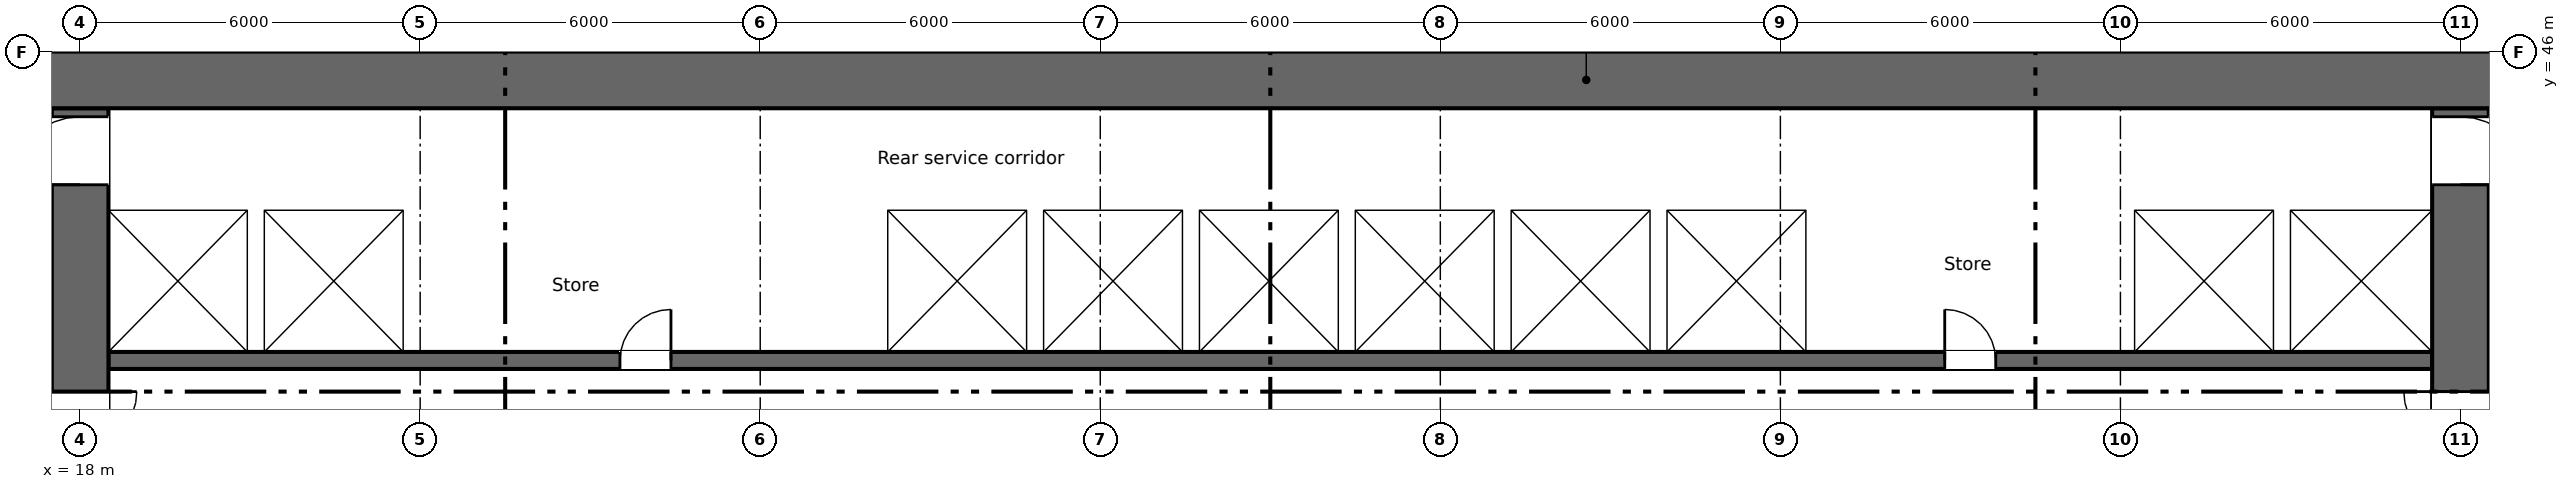
"""IFC4 building model, lengths in metres.
Left out: names, types, materials, properties, quantities, classifications, styles, units other than length and angle.
Written with IfcOpenShell. Run it as: python <this file> out.ifc"""

import sys

from ifc_helpers import new_model, si_unit, direction, frame, frame_2d, origin, place, context, subcontext, project, spatial, rectangle, extrude, element, fill, save


model = new_model("IFC4")
c1 = context("Model", 3, precision=1e-05, world=origin(), true_north=direction((0.0, 1.0)))
c2 = subcontext(c1, "Body", "Model", "MODEL_VIEW")
j1 = project(units=[si_unit("LENGTHUNIT", "METRE"), si_unit("PLANEANGLEUNIT", "RADIAN")], contexts=[c1])
p1 = place(None, origin())
s1 = spatial("IfcSite", under=j1, at=p1, CompositionType="ELEMENT")
p2 = place(p1, origin())
s2 = spatial("IfcBuilding", under=s1, at=p2, CompositionType="ELEMENT")
p3 = place(p2, frame((0.0, 0.0, 56.25)))
s3 = spatial("IfcBuildingStorey", under=s2, at=p3, CompositionType="ELEMENT", Elevation=56.25)
p4 = place(p3, frame((5.55, 45.5, 0.0), z_axis=(0.0, 0.0, 1.0), x_axis=(1.0, 0.0, 0.0)))
e1 = element("IfcWall", 1, at=p4, inside=s3, PredefinedType="SHEAR", context=c2, shape_type="SweptSolid", body=[
    extrude(rectangle(XDim=66.9, YDim=1.0, at=frame_2d((33.45, 0.0))), origin(), (0.0, 0.0, 1.0), 3.35),
])
p5 = place(p4, frame((1.2, 0.0, 0.6)))
e2 = element("IfcOpeningElement", 2, at=p5, cuts=e1, PredefinedType="OPENING", context=c2, shape_type="SweptSolid", body=[
    extrude(rectangle(XDim=0.6, YDim=2.4, at=frame_2d((0.3, 1.2))), frame((0.0, 0.51, 0.0), z_axis=(0.0, -1.0, 0.0), x_axis=(1.0, 0.0, 0.0)), (0.0, 0.0, 1.0), 1.02),
])
p6 = place(p4, frame((7.2, 0.0, 0.6)))
e3 = element("IfcOpeningElement", 3, at=p6, cuts=e1, PredefinedType="OPENING", context=c2, shape_type="SweptSolid", body=[
    extrude(rectangle(XDim=0.6, YDim=2.4, at=frame_2d((0.3, 1.2))), frame((0.0, 0.51, 0.0), z_axis=(0.0, -1.0, 0.0), x_axis=(1.0, 0.0, 0.0)), (0.0, 0.0, 1.0), 1.02),
])
p7 = place(p4, frame((61.2, 0.0, 0.6)))
e4 = element("IfcOpeningElement", 4, at=p7, cuts=e1, PredefinedType="OPENING", context=c2, shape_type="SweptSolid", body=[
    extrude(rectangle(XDim=0.6, YDim=2.4, at=frame_2d((0.3, 1.2))), frame((0.0, 0.51, 0.0), z_axis=(0.0, -1.0, 0.0), x_axis=(1.0, 0.0, 0.0)), (0.0, 0.0, 1.0), 1.02),
])
p8 = place(p3, frame((18.0, 28.4, 0.0), z_axis=(0.0, 0.0, 1.0), x_axis=(0.0, 1.0, 0.0)))
e5 = element("IfcWall", 5, at=p8, inside=s3, PredefinedType="SHEAR", context=c2, shape_type="SweptSolid", body=[
    extrude(rectangle(XDim=16.6, YDim=1.0, at=frame_2d((8.3, 0.0))), origin(), (0.0, 0.0, 1.0), 3.35),
])
p9 = place(p8, frame((9.6, 0.0, 0.0)))
e6 = element("IfcOpeningElement", 6, at=p9, cuts=e5, PredefinedType="OPENING", context=c2, shape_type="SweptSolid", body=[
    extrude(rectangle(XDim=2.0, YDim=2.1, at=frame_2d((1.0, 1.05))), frame((0.0, 0.51, 0.0), z_axis=(0.0, -1.0, 0.0), x_axis=(1.0, 0.0, 0.0)), (0.0, 0.0, 1.0), 1.02),
])
p10 = place(p8, frame((15.25, 0.0, 0.0)))
e7 = element("IfcOpeningElement", 7, at=p10, cuts=e5, PredefinedType="OPENING", context=c2, shape_type="SweptSolid", body=[
    extrude(rectangle(XDim=1.2, YDim=2.1, at=frame_2d((0.6, 1.05))), frame((0.0, 0.51, 0.0), z_axis=(0.0, -1.0, 0.0), x_axis=(1.0, 0.0, 0.0)), (0.0, 0.0, 1.0), 1.02),
])
p11 = place(p3, frame((60.0, 28.4, 0.0), z_axis=(0.0, 0.0, 1.0), x_axis=(0.0, 1.0, 0.0)))
e8 = element("IfcWall", 8, at=p11, inside=s3, PredefinedType="SHEAR", context=c2, shape_type="SweptSolid", body=[
    extrude(rectangle(XDim=16.6, YDim=1.0, at=frame_2d((8.3, 0.0))), origin(), (0.0, 0.0, 1.0), 3.35),
])
p12 = place(p11, frame((9.6, 0.0, 0.0)))
e9 = element("IfcOpeningElement", 9, at=p12, cuts=e8, PredefinedType="OPENING", context=c2, shape_type="SweptSolid", body=[
    extrude(rectangle(XDim=2.0, YDim=2.1, at=frame_2d((1.0, 1.05))), frame((0.0, 0.51, 0.0), z_axis=(0.0, -1.0, 0.0), x_axis=(1.0, 0.0, 0.0)), (0.0, 0.0, 1.0), 1.02),
])
p13 = place(p11, frame((15.25, 0.0, 0.0)))
e10 = element("IfcOpeningElement", 10, at=p13, cuts=e8, PredefinedType="OPENING", context=c2, shape_type="SweptSolid", body=[
    extrude(rectangle(XDim=1.2, YDim=2.1, at=frame_2d((0.6, 1.05))), frame((0.0, 0.51, 0.0), z_axis=(0.0, -1.0, 0.0), x_axis=(1.0, 0.0, 0.0)), (0.0, 0.0, 1.0), 1.02),
])
p14 = place(p3, frame((18.5, 40.55, 0.0), z_axis=(0.0, 0.0, 1.0), x_axis=(1.0, 0.0, 0.0)))
e11 = element("IfcWall", 11, at=p14, inside=s3, PredefinedType="SHEAR", context=c2, shape_type="SweptSolid", body=[
    extrude(rectangle(XDim=41.0, YDim=0.3, at=frame_2d((20.5, 0.0))), origin(), (0.0, 0.0, 1.0), 3.35),
])
p15 = place(p14, frame((9.025, 0.0, 0.0)))
e12 = element("IfcOpeningElement", 12, at=p15, cuts=e11, PredefinedType="OPENING", context=c2, shape_type="SweptSolid", body=[
    extrude(rectangle(XDim=0.9, YDim=2.1, at=frame_2d((0.45, 1.05))), frame((0.0, 0.16, 0.0), z_axis=(0.0, -1.0, 0.0), x_axis=(1.0, 0.0, 0.0)), (0.0, 0.0, 1.0), 0.32),
])
p16 = place(p14, frame((32.4, 0.0, 0.0)))
e13 = element("IfcOpeningElement", 13, at=p16, cuts=e11, PredefinedType="OPENING", context=c2, shape_type="SweptSolid", body=[
    extrude(rectangle(XDim=0.9, YDim=2.1, at=frame_2d((0.45, 1.05))), frame((0.0, 0.16, 0.0), z_axis=(0.0, -1.0, 0.0), x_axis=(1.0, 0.0, 0.0)), (0.0, 0.0, 1.0), 0.32),
])
p17 = place(p14, frame((14.425, 0.0, 0.0)))
e14 = element("IfcOpeningElement", 14, at=p17, cuts=e11, PredefinedType="OPENING", context=c2, shape_type="SweptSolid", body=[
    extrude(rectangle(XDim=1.1, YDim=2.1, at=frame_2d((0.55, 1.05))), frame((0.0, 0.16, 0.0), z_axis=(0.0, -1.0, 0.0), x_axis=(1.0, 0.0, 0.0)), (0.0, 0.0, 1.0), 0.32),
])
p18 = place(p14, frame((17.175, 0.0, 0.0)))
e15 = element("IfcOpeningElement", 15, at=p18, cuts=e11, PredefinedType="OPENING", context=c2, shape_type="SweptSolid", body=[
    extrude(rectangle(XDim=1.1, YDim=2.1, at=frame_2d((0.55, 1.05))), frame((0.0, 0.16, 0.0), z_axis=(0.0, -1.0, 0.0), x_axis=(1.0, 0.0, 0.0)), (0.0, 0.0, 1.0), 0.32),
])
p19 = place(p14, frame((19.925, 0.0, 0.0)))
e16 = element("IfcOpeningElement", 16, at=p19, cuts=e11, PredefinedType="OPENING", context=c2, shape_type="SweptSolid", body=[
    extrude(rectangle(XDim=1.1, YDim=2.1, at=frame_2d((0.55, 1.05))), frame((0.0, 0.16, 0.0), z_axis=(0.0, -1.0, 0.0), x_axis=(1.0, 0.0, 0.0)), (0.0, 0.0, 1.0), 0.32),
])
p20 = place(p14, frame((22.675, 0.0, 0.0)))
e17 = element("IfcOpeningElement", 17, at=p20, cuts=e11, PredefinedType="OPENING", context=c2, shape_type="SweptSolid", body=[
    extrude(rectangle(XDim=1.1, YDim=2.1, at=frame_2d((0.55, 1.05))), frame((0.0, 0.16, 0.0), z_axis=(0.0, -1.0, 0.0), x_axis=(1.0, 0.0, 0.0)), (0.0, 0.0, 1.0), 0.32),
])
p21 = place(p14, frame((36.375, 0.0, 0.0)))
e18 = element("IfcOpeningElement", 18, at=p21, cuts=e11, PredefinedType="OPENING", context=c2, shape_type="SweptSolid", body=[
    extrude(rectangle(XDim=1.2, YDim=2.1, at=frame_2d((0.6, 1.05))), frame((0.0, 0.16, 0.0), z_axis=(0.0, -1.0, 0.0), x_axis=(1.0, 0.0, 0.0)), (0.0, 0.0, 1.0), 0.32),
])
p22 = place(p14, frame((39.15, 0.0, 0.0)))
e19 = element("IfcOpeningElement", 19, at=p22, cuts=e11, PredefinedType="OPENING", context=c2, shape_type="SweptSolid", body=[
    extrude(rectangle(XDim=1.2, YDim=2.1, at=frame_2d((0.6, 1.05))), frame((0.0, 0.16, 0.0), z_axis=(0.0, -1.0, 0.0), x_axis=(1.0, 0.0, 0.0)), (0.0, 0.0, 1.0), 0.32),
])
p23 = place(p3, frame((18.5, 43.35, 0.0), z_axis=(0.0, 0.0, 1.0), x_axis=(1.0, 0.0, 0.0)))
e20 = element("IfcWall", 20, at=p23, inside=s3, PredefinedType="SHEAR", context=c2, shape_type="SweptSolid", body=[
    extrude(rectangle(XDim=41.0, YDim=0.3, at=frame_2d((20.5, 0.0))), origin(), (0.0, 0.0, 1.0), 3.35),
])
for number, where, z_axis, x_axis in (
    (21, (21.1, 40.7, 0.0), (0.0, 0.0, 1.0), (0.0, 1.0, 0.0)),
    (22, (23.85, 40.7, 0.0), (0.0, 0.0, 1.0), (0.0, 1.0, 0.0)),
    (23, (32.1, 40.7, 0.0), (0.0, 0.0, 1.0), (0.0, 1.0, 0.0)),
    (24, (34.85, 40.7, 0.0), (0.0, 0.0, 1.0), (0.0, 1.0, 0.0)),
    (25, (37.6, 40.7, 0.0), (0.0, 0.0, 1.0), (0.0, 1.0, 0.0)),
    (26, (40.35, 40.7, 0.0), (0.0, 0.0, 1.0), (0.0, 1.0, 0.0)),
    (27, (43.1, 40.7, 0.0), (0.0, 0.0, 1.0), (0.0, 1.0, 0.0)),
    (28, (45.85, 40.7, 0.0), (0.0, 0.0, 1.0), (0.0, 1.0, 0.0)),
    (29, (48.6, 40.7, 0.0), (0.0, 0.0, 1.0), (0.0, 1.0, 0.0)),
    (30, (54.1, 40.7, 0.0), (0.0, 0.0, 1.0), (0.0, 1.0, 0.0)),
    (31, (56.85, 40.7, 0.0), (0.0, 0.0, 1.0), (0.0, 1.0, 0.0)),
):
    element("IfcWall", number, at=place(p3, frame(where, z_axis=z_axis, x_axis=x_axis)), inside=s3, PredefinedType="SHEAR", context=c2, shape_type="SweptSolid", body=[
        extrude(rectangle(XDim=2.5, YDim=0.3, at=frame_2d((1.25, 0.0))), origin(), (0.0, 0.0, 1.0), 3.35),
    ])
p24 = place(p15, origin())
e32 = element("IfcDoor", 32, at=p24, inside=s3, OperationType="SINGLE_SWING_RIGHT", PredefinedType="DOOR", context=c2, shape_type="SweptSolid", body=[
    extrude(rectangle(XDim=0.9, YDim=2.1, at=frame_2d((0.45, 1.05))), frame((0.0, 0.025, 0.0), z_axis=(0.0, -1.0, 0.0), x_axis=(1.0, 0.0, 0.0)), (0.0, 0.0, 1.0), 0.05),
])
fill(e12, e32)
p25 = place(p16, origin())
e33 = element("IfcDoor", 33, at=p25, inside=s3, OperationType="SINGLE_SWING_LEFT", PredefinedType="DOOR", context=c2, shape_type="SweptSolid", body=[
    extrude(rectangle(XDim=0.9, YDim=2.1, at=frame_2d((0.45, 1.05))), frame((0.0, 0.025, 0.0), z_axis=(0.0, -1.0, 0.0), x_axis=(1.0, 0.0, 0.0)), (0.0, 0.0, 1.0), 0.05),
])
fill(e13, e33)
p26 = place(p17, origin())
e34 = element("IfcDoor", 34, at=p26, inside=s3, OperationType="SLIDING_TO_LEFT", PredefinedType="DOOR", context=c2, shape_type="SweptSolid", body=[
    extrude(rectangle(XDim=1.1, YDim=2.1, at=frame_2d((0.55, 1.05))), frame((0.0, 0.025, 0.0), z_axis=(0.0, -1.0, 0.0), x_axis=(1.0, 0.0, 0.0)), (0.0, 0.0, 1.0), 0.05),
])
fill(e14, e34)
p27 = place(p18, origin())
e35 = element("IfcDoor", 35, at=p27, inside=s3, OperationType="SLIDING_TO_LEFT", PredefinedType="DOOR", context=c2, shape_type="SweptSolid", body=[
    extrude(rectangle(XDim=1.1, YDim=2.1, at=frame_2d((0.55, 1.05))), frame((0.0, 0.025, 0.0), z_axis=(0.0, -1.0, 0.0), x_axis=(1.0, 0.0, 0.0)), (0.0, 0.0, 1.0), 0.05),
])
fill(e15, e35)
p28 = place(p19, origin())
e36 = element("IfcDoor", 36, at=p28, inside=s3, OperationType="SLIDING_TO_LEFT", PredefinedType="DOOR", context=c2, shape_type="SweptSolid", body=[
    extrude(rectangle(XDim=1.1, YDim=2.1, at=frame_2d((0.55, 1.05))), frame((0.0, 0.025, 0.0), z_axis=(0.0, -1.0, 0.0), x_axis=(1.0, 0.0, 0.0)), (0.0, 0.0, 1.0), 0.05),
])
fill(e16, e36)
p29 = place(p20, origin())
e37 = element("IfcDoor", 37, at=p29, inside=s3, OperationType="SLIDING_TO_LEFT", PredefinedType="DOOR", context=c2, shape_type="SweptSolid", body=[
    extrude(rectangle(XDim=1.1, YDim=2.1, at=frame_2d((0.55, 1.05))), frame((0.0, 0.025, 0.0), z_axis=(0.0, -1.0, 0.0), x_axis=(1.0, 0.0, 0.0)), (0.0, 0.0, 1.0), 0.05),
])
fill(e17, e37)
p30 = place(p21, origin())
e38 = element("IfcDoor", 38, at=p30, inside=s3, OperationType="SLIDING_TO_LEFT", PredefinedType="DOOR", context=c2, shape_type="SweptSolid", body=[
    extrude(rectangle(XDim=1.2, YDim=2.1, at=frame_2d((0.6, 1.05))), frame((0.0, 0.025, 0.0), z_axis=(0.0, -1.0, 0.0), x_axis=(1.0, 0.0, 0.0)), (0.0, 0.0, 1.0), 0.05),
])
fill(e18, e38)
p31 = place(p22, origin())
e39 = element("IfcDoor", 39, at=p31, inside=s3, OperationType="SLIDING_TO_LEFT", PredefinedType="DOOR", context=c2, shape_type="SweptSolid", body=[
    extrude(rectangle(XDim=1.2, YDim=2.1, at=frame_2d((0.6, 1.05))), frame((0.0, 0.025, 0.0), z_axis=(0.0, -1.0, 0.0), x_axis=(1.0, 0.0, 0.0)), (0.0, 0.0, 1.0), 0.05),
])
fill(e19, e39)
p32 = place(p9, origin())
e40 = element("IfcDoor", 40, at=p32, inside=s3, OperationType="DOUBLE_DOOR_SINGLE_SWING", PredefinedType="DOOR", context=c2, shape_type="SweptSolid", body=[
    extrude(rectangle(XDim=2.0, YDim=2.1, at=frame_2d((1.0, 1.05))), frame((0.0, 0.025, 0.0), z_axis=(0.0, -1.0, 0.0), x_axis=(1.0, 0.0, 0.0)), (0.0, 0.0, 1.0), 0.05),
])
fill(e6, e40)
p33 = place(p12, origin())
e41 = element("IfcDoor", 41, at=p33, inside=s3, OperationType="DOUBLE_DOOR_SINGLE_SWING", PredefinedType="DOOR", context=c2, shape_type="SweptSolid", body=[
    extrude(rectangle(XDim=2.0, YDim=2.1, at=frame_2d((1.0, 1.05))), frame((0.0, 0.025, 0.0), z_axis=(0.0, -1.0, 0.0), x_axis=(1.0, 0.0, 0.0)), (0.0, 0.0, 1.0), 0.05),
])
fill(e9, e41)
p34 = place(p10, origin())
e42 = element("IfcDoor", 42, at=p34, inside=s3, OperationType="SINGLE_SWING_LEFT", PredefinedType="DOOR", context=c2, shape_type="SweptSolid", body=[
    extrude(rectangle(XDim=1.2, YDim=2.1, at=frame_2d((0.6, 1.05))), frame((0.0, 0.025, 0.0), z_axis=(0.0, -1.0, 0.0), x_axis=(1.0, 0.0, 0.0)), (0.0, 0.0, 1.0), 0.05),
])
fill(e7, e42)
p35 = place(p13, origin())
e43 = element("IfcDoor", 43, at=p35, inside=s3, OperationType="SINGLE_SWING_LEFT", PredefinedType="DOOR", context=c2, shape_type="SweptSolid", body=[
    extrude(rectangle(XDim=1.2, YDim=2.1, at=frame_2d((0.6, 1.05))), frame((0.0, 0.025, 0.0), z_axis=(0.0, -1.0, 0.0), x_axis=(1.0, 0.0, 0.0)), (0.0, 0.0, 1.0), 0.05),
])
fill(e10, e43)
save(model, sys.argv[1])
